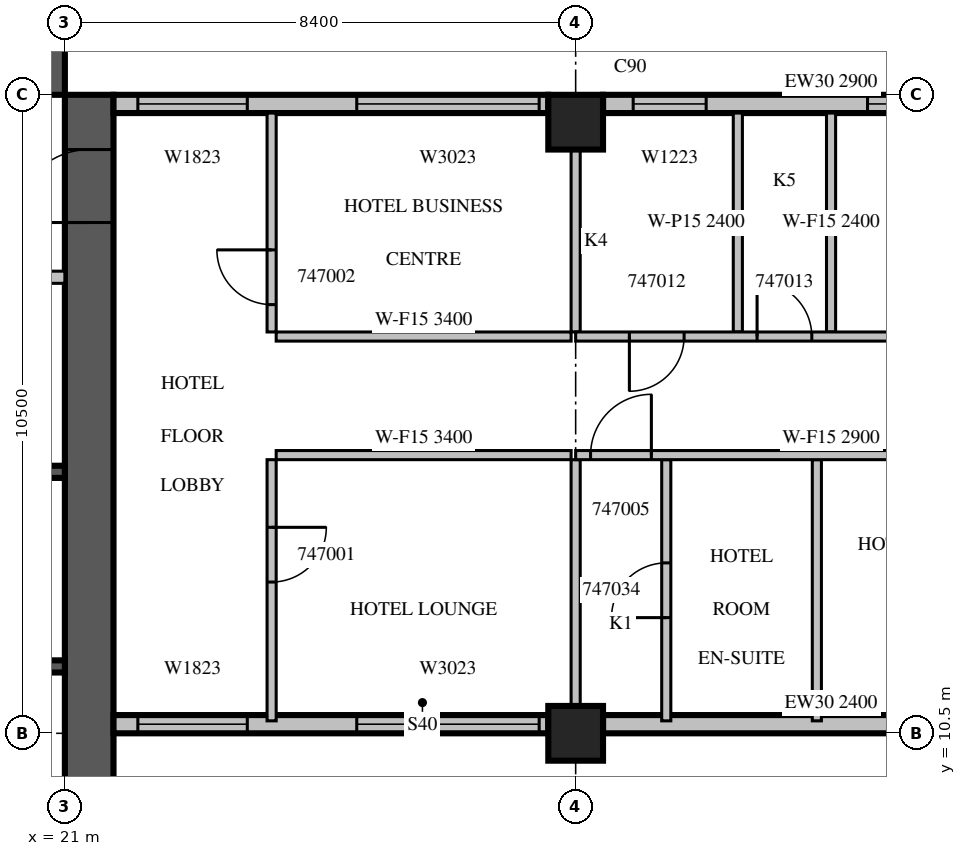
"""IFC4 building model, lengths in metres.
Left out: names, types, materials, properties, quantities, classifications, styles, units other than length and angle.
Written with IfcOpenShell. Run it as: python <this file> out.ifc"""

import sys

from ifc_helpers import new_model, si_unit, direction, frame, frame_2d, origin, origin_2d, place, context, subcontext, project, spatial, rectangle, extrude, source, transform, mapped, element, fill, save


model = new_model("IFC4")
c1 = context("Model", 3, precision=1e-05, world=origin(), true_north=direction((0.0, 1.0)))
c2 = subcontext(c1, "Body", "Model", "MODEL_VIEW")
j1 = project(units=[si_unit("LENGTHUNIT", "METRE"), si_unit("PLANEANGLEUNIT", "RADIAN")], contexts=[c1])
p1 = place(None, origin())
s1 = spatial("IfcSite", under=j1, at=p1, CompositionType="ELEMENT")
p2 = place(p1, origin())
s2 = spatial("IfcBuilding", under=s1, at=p2, CompositionType="ELEMENT")
p3 = place(p2, frame((0.0, 0.0, 212.0)))
s3 = spatial("IfcBuildingStorey", under=s2, at=p3, CompositionType="ELEMENT", Elevation=212.0)
m1 = source(origin(), c2, "Body", "SweptSolid", [
    extrude(rectangle(XDim=0.9, YDim=0.9, at=origin_2d()), origin(), (0.0, 0.0, 1.0), 3.8),
])
for number, where, z_axis, x_axis in (
    (1, (29.4, 10.5, 0.0), (0.0, 0.0, 1.0), (1.0, 0.0, 0.0)),
    (2, (29.4, 20.55, 0.0), (0.0, 0.0, 1.0), (1.0, 0.0, 0.0)),
):
    element("IfcColumn", number, at=place(p3, frame(where, z_axis=z_axis, x_axis=x_axis)), inside=s3, PredefinedType="COLUMN", context=c2, shape_type="MappedRepresentation", body=[
        mapped(m1, transform((0.0, 0.0, 0.0), scale=1.0)),
    ])
m2 = source(origin(), c2, "Body", "SweptSolid", [
    extrude(rectangle(XDim=16.8, YDim=0.8, at=frame_2d((8.4, 0.0))), origin(), (0.0, 0.0, 1.0), 3.8),
])
p4 = place(p3, frame((21.4, 4.2, 0.0), z_axis=(0.0, 0.0, 1.0), x_axis=(0.0, 1.0, 0.0)))
e3 = element("IfcWall", 3, at=p4, inside=s3, PredefinedType="SHEAR", context=c2, shape_type="MappedRepresentation", body=[
    mapped(m2, transform((0.0, 0.0, 0.0), scale=1.0)),
])
m3 = source(origin(), c2, "Body", "SweptSolid", [
    extrude(rectangle(XDim=1.2, YDim=2.1, at=frame_2d((0.6, 1.05))), frame((0.0, 0.41, 0.0), z_axis=(0.0, -1.0, 0.0), x_axis=(1.0, 0.0, 0.0)), (0.0, 0.0, 1.0), 0.82),
])
p5 = place(p4, frame((14.7, 0.0, 0.0)))
e4 = element("IfcOpeningElement", 4, at=p5, cuts=e3, PredefinedType="OPENING", context=c2, shape_type="MappedRepresentation", body=[
    mapped(m3, transform((0.0, 0.0, 0.0), scale=1.0)),
])
p6 = place(p3, frame((4.2, 21.4, 0.0), z_axis=(0.0, 0.0, 1.0), x_axis=(1.0, 0.0, 0.0)))
e5 = element("IfcWall", 5, at=p6, inside=s3, PredefinedType="SHEAR", context=c2, shape_type="MappedRepresentation", body=[
    mapped(m2, transform((0.0, 0.0, 0.0), scale=1.0)),
])
p7 = place(p6, frame((6.2, 0.0, 0.0)))
e6 = element("IfcOpeningElement", 6, at=p7, cuts=e5, PredefinedType="OPENING", context=c2, shape_type="MappedRepresentation", body=[
    mapped(m3, transform((0.0, 0.0, 0.0), scale=1.0)),
])
m4 = source(origin(), c2, "Body", "SweptSolid", [
    extrude(rectangle(XDim=7.15, YDim=0.3, at=frame_2d((3.575, 0.0))), origin(), (0.0, 0.0, 1.0), 3.4),
])
p8 = place(p3, frame((21.8, 10.65, 0.0), z_axis=(0.0, 0.0, 1.0), x_axis=(1.0, 0.0, 0.0)))
e7 = element("IfcWall", 7, at=p8, inside=s3, PredefinedType="STANDARD", context=c2, shape_type="MappedRepresentation", body=[
    mapped(m4, transform((0.0, 0.0, 0.0), scale=1.0)),
])
m5 = source(origin(), c2, "Body", "SweptSolid", [
    extrude(rectangle(XDim=1.8, YDim=2.3, at=frame_2d((0.9, 1.15))), frame((0.0, 0.16, 0.0), z_axis=(0.0, -1.0, 0.0), x_axis=(1.0, 0.0, 0.0)), (0.0, 0.0, 1.0), 0.32),
])
p9 = place(p8, frame((0.4, 0.0, 0.6)))
e8 = element("IfcOpeningElement", 8, at=p9, cuts=e7, PredefinedType="OPENING", context=c2, shape_type="MappedRepresentation", body=[
    mapped(m5, transform((0.0, 0.0, 0.0), scale=1.0)),
])
m6 = source(origin(), c2, "Body", "SweptSolid", [
    extrude(rectangle(XDim=3.0, YDim=2.3, at=frame_2d((1.5, 1.15))), frame((0.0, 0.16, 0.0), z_axis=(0.0, -1.0, 0.0), x_axis=(1.0, 0.0, 0.0)), (0.0, 0.0, 1.0), 0.32),
])
p10 = place(p8, frame((4.0, 0.0, 0.6)))
e9 = element("IfcOpeningElement", 9, at=p10, cuts=e7, PredefinedType="OPENING", context=c2, shape_type="MappedRepresentation", body=[
    mapped(m6, transform((0.0, 0.0, 0.0), scale=1.0)),
])
m7 = source(origin(), c2, "Body", "SweptSolid", [
    extrude(rectangle(XDim=7.5, YDim=0.3, at=frame_2d((3.75, 0.0))), origin(), (0.0, 0.0, 1.0), 2.4),
])
p11 = place(p3, frame((29.85, 10.65, 0.0), z_axis=(0.0, 0.0, 1.0), x_axis=(1.0, 0.0, 0.0)))
e10 = element("IfcWall", 10, at=p11, inside=s3, PredefinedType="STANDARD", context=c2, shape_type="MappedRepresentation", body=[
    mapped(m7, transform((0.0, 0.0, 0.0), scale=1.0)),
])
m8 = source(origin(), c2, "Body", "SweptSolid", [
    extrude(rectangle(XDim=7.5, YDim=0.3, at=frame_2d((3.75, 0.0))), origin(), (0.0, 0.0, 1.0), 2.9),
])
p12 = place(p3, frame((37.35, 20.85, 0.0), z_axis=(0.0, 0.0, 1.0), x_axis=(-1.0, 0.0, 0.0)))
e11 = element("IfcWall", 11, at=p12, inside=s3, PredefinedType="STANDARD", context=c2, shape_type="MappedRepresentation", body=[
    mapped(m8, transform((0.0, 0.0, 0.0), scale=1.0)),
])
p13 = place(p12, frame((0.15, 0.0, 0.6)))
e12 = element("IfcOpeningElement", 12, at=p13, cuts=e11, PredefinedType="OPENING", context=c2, shape_type="MappedRepresentation", body=[
    mapped(m6, transform((0.0, 0.0, 0.0), scale=1.0)),
])
m9 = source(origin(), c2, "Body", "SweptSolid", [
    extrude(rectangle(XDim=1.2, YDim=2.3, at=frame_2d((0.6, 1.15))), frame((0.0, 0.16, 0.0), z_axis=(0.0, -1.0, 0.0), x_axis=(1.0, 0.0, 0.0)), (0.0, 0.0, 1.0), 0.32),
])
p14 = place(p12, frame((5.804, 0.0, 0.6)))
e13 = element("IfcOpeningElement", 13, at=p14, cuts=e11, PredefinedType="OPENING", context=c2, shape_type="MappedRepresentation", body=[
    mapped(m9, transform((0.0, 0.0, 0.0), scale=1.0)),
])
p15 = place(p3, frame((28.95, 20.85, 0.0), z_axis=(0.0, 0.0, 1.0), x_axis=(-1.0, 0.0, 0.0)))
e14 = element("IfcWall", 14, at=p15, inside=s3, PredefinedType="STANDARD", context=c2, shape_type="MappedRepresentation", body=[
    mapped(m4, transform((0.0, 0.0, 0.0), scale=1.0)),
])
p16 = place(p15, frame((0.15, 0.0, 0.6)))
e15 = element("IfcOpeningElement", 15, at=p16, cuts=e14, PredefinedType="OPENING", context=c2, shape_type="MappedRepresentation", body=[
    mapped(m6, transform((0.0, 0.0, 0.0), scale=1.0)),
])
p17 = place(p15, frame((4.95, 0.0, 0.6)))
e16 = element("IfcOpeningElement", 16, at=p17, cuts=e14, PredefinedType="OPENING", context=c2, shape_type="MappedRepresentation", body=[
    mapped(m5, transform((0.0, 0.0, 0.0), scale=1.0)),
])
m10 = source(origin(), c2, "Body", "SweptSolid", [
    extrude(rectangle(XDim=9.6, YDim=0.2, at=frame_2d((4.8, 0.0))), origin(), (0.0, 0.0, 1.0), 3.8),
])
p18 = place(p3, frame((11.4, 11.6, 0.0), z_axis=(0.0, 0.0, 1.0), x_axis=(1.0, 0.0, 0.0)))
e17 = element("IfcWall", 17, at=p18, inside=s3, PredefinedType="SOLIDWALL", context=c2, shape_type="MappedRepresentation", body=[
    mapped(m10, transform((0.0, 0.0, 0.0), scale=1.0)),
])
p19 = place(p3, frame((11.4, 14.8, 0.0), z_axis=(0.0, 0.0, 1.0), x_axis=(1.0, 0.0, 0.0)))
e18 = element("IfcWall", 18, at=p19, inside=s3, PredefinedType="SOLIDWALL", context=c2, shape_type="MappedRepresentation", body=[
    mapped(m10, transform((0.0, 0.0, 0.0), scale=1.0)),
])
m11 = source(origin(), c2, "Body", "SweptSolid", [
    extrude(rectangle(XDim=1.1, YDim=2.1, at=frame_2d((0.55, 1.05))), frame((0.0, 0.11, 0.0), z_axis=(0.0, -1.0, 0.0), x_axis=(1.0, 0.0, 0.0)), (0.0, 0.0, 1.0), 0.22),
])
p20 = place(p19, frame((3.05, 0.0, 0.0)))
e19 = element("IfcOpeningElement", 19, at=p20, cuts=e18, PredefinedType="OPENING", context=c2, shape_type="MappedRepresentation", body=[
    mapped(m11, transform((0.0, 0.0, 0.0), scale=1.0)),
])
p21 = place(p19, frame((5.45, 0.0, 0.0)))
e20 = element("IfcOpeningElement", 20, at=p21, cuts=e18, PredefinedType="OPENING", context=c2, shape_type="MappedRepresentation", body=[
    mapped(m11, transform((0.0, 0.0, 0.0), scale=1.0)),
])
p22 = place(p19, frame((7.85, 0.0, 0.0)))
e21 = element("IfcOpeningElement", 21, at=p22, cuts=e18, PredefinedType="OPENING", context=c2, shape_type="MappedRepresentation", body=[
    mapped(m11, transform((0.0, 0.0, 0.0), scale=1.0)),
])
m12 = source(origin(), c2, "Body", "SweptSolid", [
    extrude(rectangle(XDim=11.45, YDim=0.2, at=frame_2d((5.725, 0.0))), origin(), (0.0, 0.0, 1.0), 3.4),
])
p23 = place(p3, frame((9.55, 18.0, 0.0), z_axis=(0.0, 0.0, 1.0), x_axis=(1.0, 0.0, 0.0)))
e22 = element("IfcWall", 22, at=p23, inside=s3, PredefinedType="PARTITIONING", context=c2, shape_type="MappedRepresentation", body=[
    mapped(m12, transform((0.0, 0.0, 0.0), scale=1.0)),
])
m13 = source(origin(), c2, "Body", "SweptSolid", [
    extrude(rectangle(XDim=0.9, YDim=2.1, at=frame_2d((0.45, 1.05))), frame((0.0, 0.11, 0.0), z_axis=(0.0, -1.0, 0.0), x_axis=(1.0, 0.0, 0.0)), (0.0, 0.0, 1.0), 0.22),
])
p24 = place(p23, frame((0.725, 0.0, 0.0)))
e23 = element("IfcOpeningElement", 23, at=p24, cuts=e22, PredefinedType="OPENING", context=c2, shape_type="MappedRepresentation", body=[
    mapped(m13, transform((0.0, 0.0, 0.0), scale=1.0)),
])
p25 = place(p23, frame((2.775, 0.0, 0.0)))
e24 = element("IfcOpeningElement", 24, at=p25, cuts=e22, PredefinedType="OPENING", context=c2, shape_type="MappedRepresentation", body=[
    mapped(m13, transform((0.0, 0.0, 0.0), scale=1.0)),
])
p26 = place(p23, frame((7.35, 0.0, 0.0)))
e25 = element("IfcOpeningElement", 25, at=p26, cuts=e22, PredefinedType="OPENING", context=c2, shape_type="MappedRepresentation", body=[
    mapped(m11, transform((0.0, 0.0, 0.0), scale=1.0)),
])
m14 = source(origin(), c2, "Body", "SweptSolid", [
    extrude(rectangle(XDim=4.295, YDim=0.15, at=frame_2d((2.147, 0.0))), origin(), (0.0, 0.0, 1.0), 3.4),
])
p27 = place(p3, frame((24.4, 15.0, 0.0), z_axis=(0.0, 0.0, 1.0), x_axis=(0.0, -1.0, 0.0)))
e26 = element("IfcWall", 26, at=p27, inside=s3, PredefinedType="PARTITIONING", context=c2, shape_type="MappedRepresentation", body=[
    mapped(m14, transform((0.0, 0.0, 0.0), scale=1.0)),
])
m15 = source(origin(), c2, "Body", "SweptSolid", [
    extrude(rectangle(XDim=0.9, YDim=2.1, at=frame_2d((0.45, 1.05))), frame((0.0, 0.085, 0.0), z_axis=(0.0, -1.0, 0.0), x_axis=(1.0, 0.0, 0.0)), (0.0, 0.0, 1.0), 0.17),
])
p28 = place(p27, frame((1.113, 0.0, 0.0)))
e27 = element("IfcOpeningElement", 27, at=p28, cuts=e26, PredefinedType="OPENING", context=c2, shape_type="MappedRepresentation", body=[
    mapped(m15, transform((0.0, 0.0, 0.0), scale=1.0)),
])
m16 = source(origin(), c2, "Body", "SweptSolid", [
    extrude(rectangle(XDim=3.6, YDim=0.15, at=frame_2d((1.8, 0.0))), origin(), (0.0, 0.0, 1.0), 3.4),
])
p29 = place(p3, frame((24.4, 20.7, 0.0), z_axis=(0.0, 0.0, 1.0), x_axis=(0.0, -1.0, 0.0)))
e28 = element("IfcWall", 28, at=p29, inside=s3, PredefinedType="PARTITIONING", context=c2, shape_type="MappedRepresentation", body=[
    mapped(m16, transform((0.0, 0.0, 0.0), scale=1.0)),
])
p30 = place(p29, frame((2.25, 0.0, 0.0)))
e29 = element("IfcOpeningElement", 29, at=p30, cuts=e28, PredefinedType="OPENING", context=c2, shape_type="MappedRepresentation", body=[
    mapped(m15, transform((0.0, 0.0, 0.0), scale=1.0)),
])
m17 = source(origin(), c2, "Body", "SweptSolid", [
    extrude(rectangle(XDim=4.85, YDim=0.15, at=frame_2d((2.425, 0.0))), origin(), (0.0, 0.0, 1.0), 3.4),
])
for number, where, z_axis, x_axis in (
    (30, (29.325, 15.075, 0.0), (0.0, 0.0, 1.0), (-1.0, 0.0, 0.0)),
    (31, (24.475, 17.025, 0.0), (0.0, 0.0, 1.0), (1.0, 0.0, 0.0)),
):
    element("IfcWall", number, at=place(p3, frame(where, z_axis=z_axis, x_axis=x_axis)), inside=s3, PredefinedType="PARTITIONING", context=c2, shape_type="MappedRepresentation", body=[
        mapped(m17, transform((0.0, 0.0, 0.0), scale=1.0)),
    ])
m18 = source(origin(), c2, "Body", "SweptSolid", [
    extrude(rectangle(XDim=4.051, YDim=0.15, at=frame_2d((2.026, 0.0))), origin(), (0.0, 0.0, 1.0), 3.4),
])
p31 = place(p3, frame((29.4, 10.949, 0.0), z_axis=(0.0, 0.0, 1.0), x_axis=(0.0, 1.0, 0.0)))
e32 = element("IfcWall", 32, at=p31, inside=s3, PredefinedType="PARTITIONING", context=c2, shape_type="MappedRepresentation", body=[
    mapped(m18, transform((0.0, 0.0, 0.0), scale=1.0)),
])
m19 = source(origin(), c2, "Body", "SweptSolid", [
    extrude(rectangle(XDim=3.001, YDim=0.15, at=frame_2d((1.5, 0.0))), origin(), (0.0, 0.0, 1.0), 3.4),
])
p32 = place(p3, frame((29.4, 17.1, 0.0), z_axis=(0.0, 0.0, 1.0), x_axis=(0.0, 1.0, 0.0)))
e33 = element("IfcWall", 33, at=p32, inside=s3, PredefinedType="PARTITIONING", context=c2, shape_type="MappedRepresentation", body=[
    mapped(m19, transform((0.0, 0.0, 0.0), scale=1.0)),
])
p33 = place(p3, frame((30.89, 10.705, 0.0), z_axis=(0.0, 0.0, 1.0), x_axis=(0.0, 1.0, 0.0)))
e34 = element("IfcWall", 34, at=p33, inside=s3, PredefinedType="PARTITIONING", context=c2, shape_type="MappedRepresentation", body=[
    mapped(m14, transform((0.0, 0.0, 0.0), scale=1.0)),
])
p34 = place(p33, frame((1.698, 0.0, 0.0)))
e35 = element("IfcOpeningElement", 35, at=p34, cuts=e34, PredefinedType="OPENING", context=c2, shape_type="MappedRepresentation", body=[
    mapped(m15, transform((0.0, 0.0, 0.0), scale=1.0)),
])
p35 = place(p3, frame((33.367, 10.705, 0.0), z_axis=(0.0, 0.0, 1.0), x_axis=(0.0, 1.0, 0.0)))
e36 = element("IfcWall", 36, at=p35, inside=s3, PredefinedType="PARTITIONING", context=c2, shape_type="MappedRepresentation", body=[
    mapped(m14, transform((0.0, 0.0, 0.0), scale=1.0)),
])
m20 = source(origin(), c2, "Body", "SweptSolid", [
    extrude(rectangle(XDim=3.6, YDim=0.15, at=frame_2d((1.8, 0.0))), origin(), (0.0, 0.0, 1.0), 2.4),
])
for number, where, z_axis, x_axis in (
    (37, (32.067, 20.7, 0.0), (0.0, 0.0, 1.0), (0.0, -1.0, 0.0)),
    (38, (33.6, 17.1, 0.0), (0.0, 0.0, 1.0), (0.0, 1.0, 0.0)),
):
    element("IfcWall", number, at=place(p3, frame(where, z_axis=z_axis, x_axis=x_axis)), inside=s3, PredefinedType="PARTITIONING", context=c2, shape_type="MappedRepresentation", body=[
        mapped(m20, transform((0.0, 0.0, 0.0), scale=1.0)),
    ])
m21 = source(origin(), c2, "Body", "SweptSolid", [
    extrude(rectangle(XDim=8.4, YDim=0.15, at=frame_2d((4.2, 0.0))), origin(), (0.0, 0.0, 1.0), 2.9),
])
p36 = place(p3, frame((37.8, 15.075, 0.0), z_axis=(0.0, 0.0, 1.0), x_axis=(-1.0, 0.0, 0.0)))
e39 = element("IfcWall", 39, at=p36, inside=s3, PredefinedType="PARTITIONING", context=c2, shape_type="MappedRepresentation", body=[
    mapped(m21, transform((0.0, 0.0, 0.0), scale=1.0)),
])
m22 = source(origin(), c2, "Body", "SweptSolid", [
    extrude(rectangle(XDim=1.0, YDim=2.1, at=frame_2d((0.5, 1.05))), frame((0.0, 0.085, 0.0), z_axis=(0.0, -1.0, 0.0), x_axis=(1.0, 0.0, 0.0)), (0.0, 0.0, 1.0), 0.17),
])
p37 = place(p36, frame((7.155, 0.0, 0.0)))
e40 = element("IfcOpeningElement", 40, at=p37, cuts=e39, PredefinedType="OPENING", context=c2, shape_type="MappedRepresentation", body=[
    mapped(m22, transform((0.0, 0.0, 0.0), scale=1.0)),
])
p38 = place(p36, frame((1.767, 0.0, 0.0)))
e41 = element("IfcOpeningElement", 41, at=p38, cuts=e39, PredefinedType="OPENING", context=c2, shape_type="MappedRepresentation", body=[
    mapped(m15, transform((0.0, 0.0, 0.0), scale=1.0)),
])
p39 = place(p3, frame((29.4, 17.025, 0.0), z_axis=(0.0, 0.0, 1.0), x_axis=(1.0, 0.0, 0.0)))
e42 = element("IfcWall", 42, at=p39, inside=s3, PredefinedType="PARTITIONING", context=c2, shape_type="SweptSolid", body=[
    extrude(rectangle(XDim=16.8, YDim=0.15, at=frame_2d((8.4, 0.0))), origin(), (0.0, 0.0, 1.0), 2.9),
])
p40 = place(p39, frame((0.883, 0.0, 0.0)))
e43 = element("IfcOpeningElement", 43, at=p40, cuts=e42, PredefinedType="OPENING", context=c2, shape_type="MappedRepresentation", body=[
    mapped(m15, transform((0.0, 0.0, 0.0), scale=1.0)),
])
p41 = place(p39, frame((2.983, 0.0, 0.0)))
e44 = element("IfcOpeningElement", 44, at=p41, cuts=e42, PredefinedType="OPENING", context=c2, shape_type="MappedRepresentation", body=[
    mapped(m15, transform((0.0, 0.0, 0.0), scale=1.0)),
])
p42 = place(p39, frame((7.9, 0.0, 0.0)))
e45 = element("IfcOpeningElement", 45, at=p42, cuts=e42, PredefinedType="OPENING", context=c2, shape_type="MappedRepresentation", body=[
    mapped(m22, transform((0.0, 0.0, 0.0), scale=1.0)),
])
p43 = place(p39, frame((14.354, 0.0, 0.0)))
e46 = element("IfcOpeningElement", 46, at=p43, cuts=e42, PredefinedType="OPENING", context=c2, shape_type="MappedRepresentation", body=[
    mapped(m22, transform((0.0, 0.0, 0.0), scale=1.0)),
])
m23 = source(origin(), c2, "Body", "SweptSolid", [
    extrude(rectangle(XDim=1.8, YDim=2.3, at=frame_2d((0.9, 1.15))), frame((0.0, 0.03, 0.0), z_axis=(0.0, -1.0, 0.0), x_axis=(1.0, 0.0, 0.0)), (0.0, 0.0, 1.0), 0.06),
])
p44 = place(p9, origin())
e47 = element("IfcWindow", 47, at=p44, inside=s3, PartitioningType="SINGLE_PANEL", PredefinedType="WINDOW", context=c2, shape_type="MappedRepresentation", body=[
    mapped(m23, transform((0.0, 0.0, 0.0), scale=1.0)),
])
fill(e8, e47)
m24 = source(origin(), c2, "Body", "SweptSolid", [
    extrude(rectangle(XDim=3.0, YDim=2.3, at=frame_2d((1.5, 1.15))), frame((0.0, 0.03, 0.0), z_axis=(0.0, -1.0, 0.0), x_axis=(1.0, 0.0, 0.0)), (0.0, 0.0, 1.0), 0.06),
])
p45 = place(p10, origin())
e48 = element("IfcWindow", 48, at=p45, inside=s3, PartitioningType="SINGLE_PANEL", PredefinedType="WINDOW", context=c2, shape_type="MappedRepresentation", body=[
    mapped(m24, transform((0.0, 0.0, 0.0), scale=1.0)),
])
fill(e9, e48)
p46 = place(p13, origin())
e49 = element("IfcWindow", 49, at=p46, inside=s3, PartitioningType="SINGLE_PANEL", PredefinedType="WINDOW", context=c2, shape_type="MappedRepresentation", body=[
    mapped(m24, transform((0.0, 0.0, 0.0), scale=1.0)),
])
fill(e12, e49)
m25 = source(origin(), c2, "Body", "SweptSolid", [
    extrude(rectangle(XDim=1.2, YDim=2.3, at=frame_2d((0.6, 1.15))), frame((0.0, 0.03, 0.0), z_axis=(0.0, -1.0, 0.0), x_axis=(1.0, 0.0, 0.0)), (0.0, 0.0, 1.0), 0.06),
])
p47 = place(p14, origin())
e50 = element("IfcWindow", 50, at=p47, inside=s3, PartitioningType="SINGLE_PANEL", PredefinedType="WINDOW", context=c2, shape_type="MappedRepresentation", body=[
    mapped(m25, transform((0.0, 0.0, 0.0), scale=1.0)),
])
fill(e13, e50)
p48 = place(p16, origin())
e51 = element("IfcWindow", 51, at=p48, inside=s3, PartitioningType="SINGLE_PANEL", PredefinedType="WINDOW", context=c2, shape_type="MappedRepresentation", body=[
    mapped(m24, transform((0.0, 0.0, 0.0), scale=1.0)),
])
fill(e15, e51)
p49 = place(p17, origin())
e52 = element("IfcWindow", 52, at=p49, inside=s3, PartitioningType="SINGLE_PANEL", PredefinedType="WINDOW", context=c2, shape_type="MappedRepresentation", body=[
    mapped(m23, transform((0.0, 0.0, 0.0), scale=1.0)),
])
fill(e16, e52)
m26 = source(origin(), c2, "Body", "SweptSolid", [
    extrude(rectangle(XDim=1.2, YDim=2.1, at=frame_2d((0.6, 1.05))), frame((0.0, 0.025, 0.0), z_axis=(0.0, -1.0, 0.0), x_axis=(1.0, 0.0, 0.0)), (0.0, 0.0, 1.0), 0.05),
])
p50 = place(p5, origin())
e53 = element("IfcDoor", 53, at=p50, inside=s3, OperationType="SINGLE_SWING_LEFT", PredefinedType="DOOR", context=c2, shape_type="MappedRepresentation", body=[
    mapped(m26, transform((0.0, 0.0, 0.0), scale=1.0)),
])
fill(e4, e53)
m27 = source(origin(), c2, "Body", "SweptSolid", [
    extrude(rectangle(XDim=0.9, YDim=2.1, at=frame_2d((0.45, 1.05))), frame((0.0, 0.025, 0.0), z_axis=(0.0, -1.0, 0.0), x_axis=(1.0, 0.0, 0.0)), (0.0, 0.0, 1.0), 0.05),
])
p51 = place(p28, origin())
e54 = element("IfcDoor", 54, at=p51, inside=s3, OperationType="SINGLE_SWING_LEFT", PredefinedType="DOOR", context=c2, shape_type="MappedRepresentation", body=[
    mapped(m27, transform((0.0, 0.0, 0.0), scale=1.0)),
])
fill(e27, e54)
p52 = place(p30, origin())
e55 = element("IfcDoor", 55, at=p52, inside=s3, OperationType="SINGLE_SWING_RIGHT", PredefinedType="DOOR", context=c2, shape_type="MappedRepresentation", body=[
    mapped(m27, transform((0.0, 0.0, 0.0), scale=1.0)),
])
fill(e29, e55)
m28 = source(origin(), c2, "Body", "SweptSolid", [
    extrude(rectangle(XDim=1.0, YDim=2.1, at=frame_2d((0.5, 1.05))), frame((0.0, 0.025, 0.0), z_axis=(0.0, -1.0, 0.0), x_axis=(1.0, 0.0, 0.0)), (0.0, 0.0, 1.0), 0.05),
])
p53 = place(p37, origin())
e56 = element("IfcDoor", 56, at=p53, inside=s3, OperationType="SINGLE_SWING_RIGHT", PredefinedType="DOOR", context=c2, shape_type="MappedRepresentation", body=[
    mapped(m28, transform((0.0, 0.0, 0.0), scale=1.0)),
])
fill(e40, e56)
p54 = place(p40, origin())
e57 = element("IfcDoor", 57, at=p54, inside=s3, OperationType="SINGLE_SWING_RIGHT", PredefinedType="DOOR", context=c2, shape_type="MappedRepresentation", body=[
    mapped(m27, transform((0.0, 0.0, 0.0), scale=1.0)),
])
fill(e43, e57)
p55 = place(p41, origin())
e58 = element("IfcDoor", 58, at=p55, inside=s3, OperationType="SINGLE_SWING_LEFT", PredefinedType="DOOR", context=c2, shape_type="MappedRepresentation", body=[
    mapped(m27, transform((0.0, 0.0, 0.0), scale=1.0)),
])
fill(e44, e58)
p56 = place(p34, origin())
e59 = element("IfcDoor", 59, at=p56, inside=s3, OperationType="SINGLE_SWING_LEFT", PredefinedType="DOOR", context=c2, shape_type="MappedRepresentation", body=[
    mapped(m27, transform((0.0, 0.0, 0.0), scale=1.0)),
])
fill(e35, e59)
save(model, sys.argv[1])
